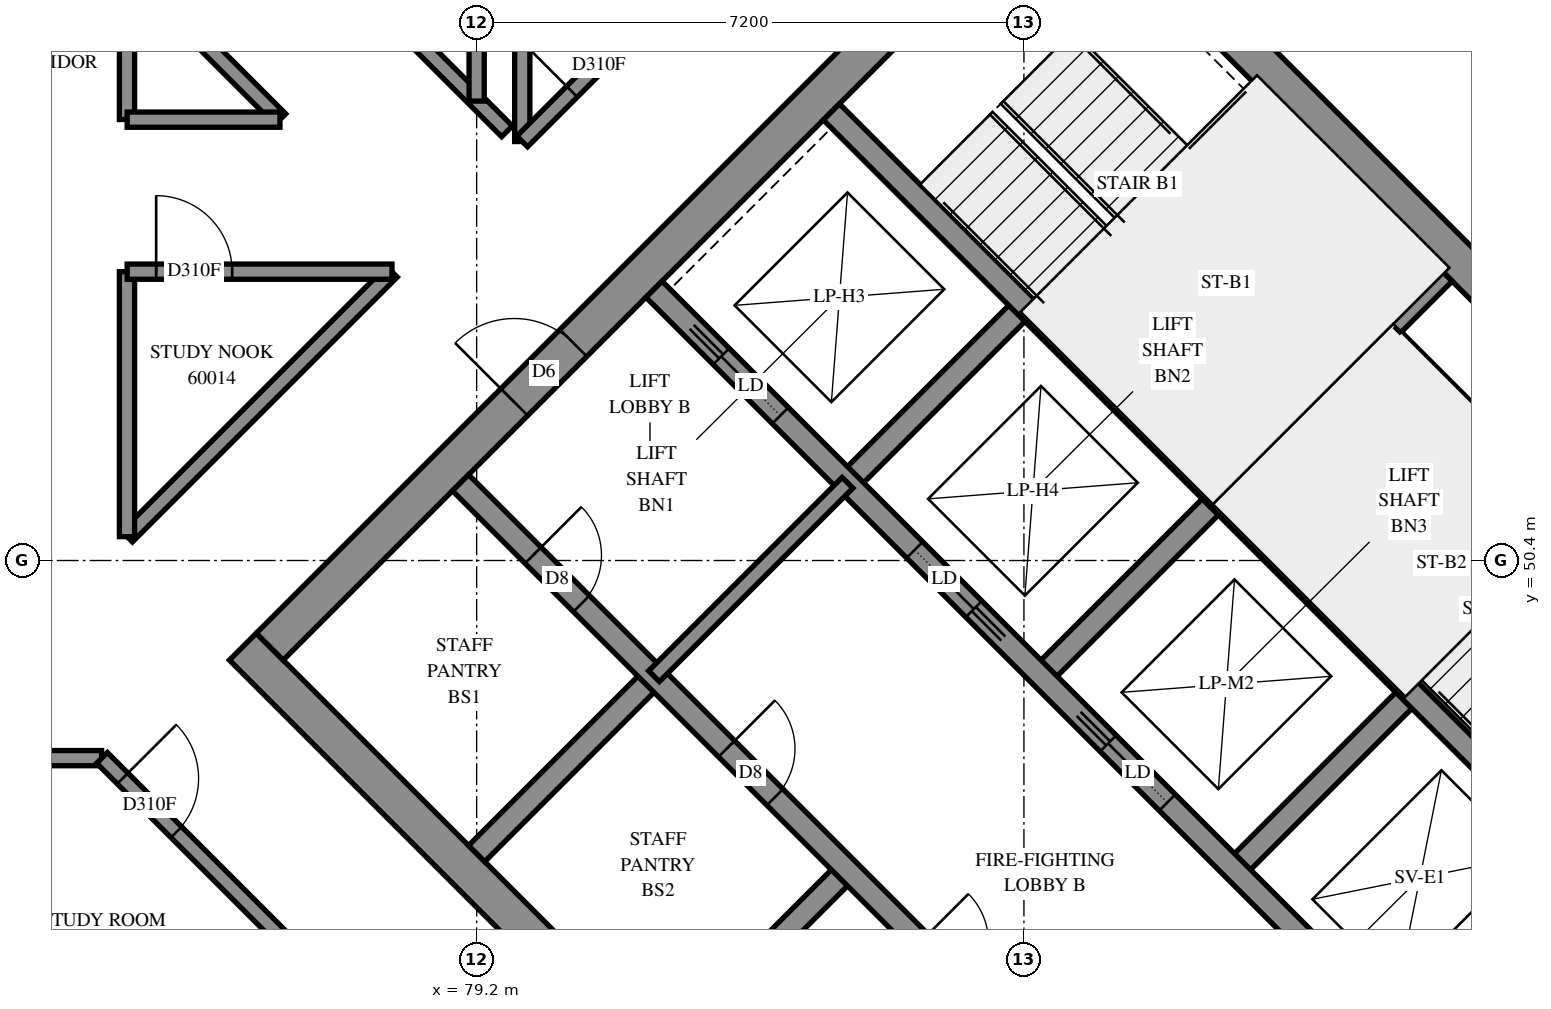
"""IFC4 building model, lengths in metres.
Left out: names, types, materials, properties, quantities, classifications, styles, units other than length and angle.
Written with IfcOpenShell. Run it as: python <this file> out.ifc"""

import sys

from ifc_helpers import new_model, si_unit, direction, frame, frame_2d, origin, place, context, subcontext, project, spatial, rectangle, extrude, element, fill, save


model = new_model("IFC4")
c1 = context("Model", 3, precision=1e-05, world=origin(), true_north=direction((0.0, 1.0)))
c2 = subcontext(c1, "Body", "Model", "MODEL_VIEW")
j1 = project(units=[si_unit("LENGTHUNIT", "METRE"), si_unit("PLANEANGLEUNIT", "RADIAN")], contexts=[c1])
p1 = place(None, origin())
s1 = spatial("IfcSite", under=j1, at=p1, CompositionType="ELEMENT")
p2 = place(p1, origin())
s2 = spatial("IfcBuilding", under=s1, at=p2, CompositionType="ELEMENT")
p3 = place(p2, frame((0.0, 0.0, 220.2)))
s3 = spatial("IfcBuildingStorey", under=s2, at=p3, CompositionType="ELEMENT", Elevation=220.2)
p4 = place(p3, frame((76.124, 49.267, -0.3), z_axis=(0.0, 0.0, 1.0), x_axis=(0.7071067812, -0.7071067812, 0.0)))
e1 = element("IfcWall", 1, at=p4, inside=s3, PredefinedType="SHEAR", context=c2, shape_type="SweptSolid", body=[
    extrude(rectangle(XDim=15.4, YDim=0.5, at=frame_2d((7.7, 0.0))), origin(), (0.0, 0.0, 1.0), 2.7),
])
p5 = place(p3, frame((86.66, 59.802, -0.3), z_axis=(0.0, 0.0, 1.0), x_axis=(0.7071067812, -0.7071067812, 0.0)))
e2 = element("IfcWall", 2, at=p5, inside=s3, PredefinedType="SHEAR", context=c2, shape_type="SweptSolid", body=[
    extrude(rectangle(XDim=15.4, YDim=0.5, at=frame_2d((7.7, 0.0))), origin(), (0.0, 0.0, 1.0), 2.7),
])
p6 = place(p5, frame((10.5, 0.0, 0.3)))
e3 = element("IfcOpeningElement", 3, at=p6, cuts=e2, PredefinedType="OPENING", context=c2, shape_type="SweptSolid", body=[
    extrude(rectangle(XDim=0.8, YDim=2.1, at=frame_2d((0.4, 1.05))), frame((0.0, 0.26, 0.0), z_axis=(0.0, -1.0, 0.0), x_axis=(1.0, 0.0, 0.0)), (0.0, 0.0, 1.0), 0.52),
])
p7 = place(p3, frame((76.478, 49.267, -0.3), z_axis=(0.0, 0.0, 1.0), x_axis=(0.7071067812, 0.7071067812, 0.0)))
e4 = element("IfcWall", 4, at=p7, inside=s3, PredefinedType="SHEAR", context=c2, shape_type="SweptSolid", body=[
    extrude(rectangle(XDim=14.4, YDim=0.5, at=frame_2d((7.2, 0.0))), origin(), (0.0, 0.0, 1.0), 2.7),
])
p8 = place(p7, frame((4.55, 0.0, 0.3)))
e5 = element("IfcOpeningElement", 5, at=p8, cuts=e4, PredefinedType="OPENING", context=c2, shape_type="SweptSolid", body=[
    extrude(rectangle(XDim=1.1, YDim=2.1, at=frame_2d((0.55, 1.05))), frame((0.0, 0.26, 0.0), z_axis=(0.0, -1.0, 0.0), x_axis=(1.0, 0.0, 0.0)), (0.0, 0.0, 1.0), 0.52),
])
p9 = place(p7, frame((11.35, 0.0, 0.3)))
e6 = element("IfcOpeningElement", 6, at=p9, cuts=e4, PredefinedType="OPENING", context=c2, shape_type="SweptSolid", body=[
    extrude(rectangle(XDim=1.1, YDim=2.1, at=frame_2d((0.55, 1.05))), frame((0.0, 0.26, 0.0), z_axis=(0.0, -1.0, 0.0), x_axis=(1.0, 0.0, 0.0)), (0.0, 0.0, 1.0), 0.52),
])
p10 = place(p3, frame((87.013, 38.731, -0.3), z_axis=(0.0, 0.0, 1.0), x_axis=(0.7071067812, 0.7071067812, 0.0)))
e7 = element("IfcWall", 7, at=p10, inside=s3, PredefinedType="SHEAR", context=c2, shape_type="SweptSolid", body=[
    extrude(rectangle(XDim=14.4, YDim=0.5, at=frame_2d((7.2, 0.0))), origin(), (0.0, 0.0, 1.0), 2.7),
])
p11 = place(p10, frame((4.55, 0.0, 0.3)))
e8 = element("IfcOpeningElement", 8, at=p11, cuts=e7, PredefinedType="OPENING", context=c2, shape_type="SweptSolid", body=[
    extrude(rectangle(XDim=1.1, YDim=2.1, at=frame_2d((0.55, 1.05))), frame((0.0, 0.26, 0.0), z_axis=(0.0, -1.0, 0.0), x_axis=(1.0, 0.0, 0.0)), (0.0, 0.0, 1.0), 0.52),
])
p12 = place(p10, frame((11.35, 0.0, 0.3)))
e9 = element("IfcOpeningElement", 9, at=p12, cuts=e7, PredefinedType="OPENING", context=c2, shape_type="SweptSolid", body=[
    extrude(rectangle(XDim=1.1, YDim=2.1, at=frame_2d((0.55, 1.05))), frame((0.0, 0.26, 0.0), z_axis=(0.0, -1.0, 0.0), x_axis=(1.0, 0.0, 0.0)), (0.0, 0.0, 1.0), 0.52),
])
for number, where, z_axis, x_axis in (
    (10, (79.2, 46.544, 0.0), (0.0, 0.0, 1.0), (0.707, 0.707, 0.0)),
    (11, (84.079, 51.423, 0.0), (0.0, 0.0, 1.0), (0.707, 0.707, 0.0)),
):
    element("IfcWall", number, at=place(p3, frame(where, z_axis=z_axis, x_axis=x_axis)), inside=s3, PredefinedType="SOLIDWALL", context=c2, shape_type="SweptSolid", body=[
        extrude(rectangle(XDim=3.3, YDim=0.3, at=frame_2d((1.65, 0.0))), origin(), (0.0, 0.0, 1.0), 3.1),
    ])
p13 = place(p3, frame((81.746, 43.999, 0.0), z_axis=(0.0, 0.0, 1.0), x_axis=(0.7071067812, 0.7071067812, 0.0)))
e12 = element("IfcWall", 12, at=p13, inside=s3, PredefinedType="SOLIDWALL", context=c2, shape_type="SweptSolid", body=[
    extrude(rectangle(XDim=3.3, YDim=0.3, at=frame_2d((1.65, 0.0))), origin(), (0.0, 0.0, 1.0), 3.1),
])
for number, where, z_axis, x_axis in (
    (13, (86.625, 48.878, 0.0), (0.0, 0.0, 1.0), (0.707, 0.707, 0.0)),
    (14, (89.17, 46.332, 0.0), (0.0, 0.0, 1.0), (0.707, 0.707, 0.0)),
):
    element("IfcWall", number, at=place(p3, frame(where, z_axis=z_axis, x_axis=x_axis)), inside=s3, PredefinedType="SOLIDWALL", context=c2, shape_type="SweptSolid", body=[
        extrude(rectangle(XDim=3.3, YDim=0.3, at=frame_2d((1.65, 0.0))), origin(), (0.0, 0.0, 1.0), 3.1),
    ])
p14 = place(p3, frame((78.988, 51.423, 0.0), z_axis=(0.0, 0.0, 1.0), x_axis=(0.7071067812, -0.7071067812, 0.0)))
e15 = element("IfcWall", 15, at=p14, inside=s3, PredefinedType="SOLIDWALL", context=c2, shape_type="SweptSolid", body=[
    extrude(rectangle(XDim=14.4, YDim=0.3, at=frame_2d((7.2, 0.0))), origin(), (0.0, 0.0, 1.0), 3.1),
])
p15 = place(p14, frame((1.35, 0.0, 0.0)))
e16 = element("IfcOpeningElement", 16, at=p15, cuts=e15, PredefinedType="OPENING", context=c2, shape_type="SweptSolid", body=[
    extrude(rectangle(XDim=0.9, YDim=2.1, at=frame_2d((0.45, 1.05))), frame((0.0, 0.16, 0.0), z_axis=(0.0, -1.0, 0.0), x_axis=(1.0, 0.0, 0.0)), (0.0, 0.0, 1.0), 0.32),
])
p16 = place(p14, frame((4.95, 0.0, 0.0)))
e17 = element("IfcOpeningElement", 17, at=p16, cuts=e15, PredefinedType="OPENING", context=c2, shape_type="SweptSolid", body=[
    extrude(rectangle(XDim=0.9, YDim=2.1, at=frame_2d((0.45, 1.05))), frame((0.0, 0.16, 0.0), z_axis=(0.0, -1.0, 0.0), x_axis=(1.0, 0.0, 0.0)), (0.0, 0.0, 1.0), 0.32),
])
p17 = place(p14, frame((8.55, 0.0, 0.0)))
e18 = element("IfcOpeningElement", 18, at=p17, cuts=e15, PredefinedType="OPENING", context=c2, shape_type="SweptSolid", body=[
    extrude(rectangle(XDim=0.9, YDim=2.1, at=frame_2d((0.45, 1.05))), frame((0.0, 0.16, 0.0), z_axis=(0.0, -1.0, 0.0), x_axis=(1.0, 0.0, 0.0)), (0.0, 0.0, 1.0), 0.32),
])
p18 = place(p14, frame((12.05, 0.0, 0.0)))
e19 = element("IfcOpeningElement", 19, at=p18, cuts=e15, PredefinedType="OPENING", context=c2, shape_type="SweptSolid", body=[
    extrude(rectangle(XDim=1.1, YDim=2.1, at=frame_2d((0.55, 1.05))), frame((0.0, 0.16, 0.0), z_axis=(0.0, -1.0, 0.0), x_axis=(1.0, 0.0, 0.0)), (0.0, 0.0, 1.0), 0.32),
])
p19 = place(p3, frame((81.534, 53.969, 0.0), z_axis=(0.0, 0.0, 1.0), x_axis=(0.707103309, -0.7071102534, 0.0)))
e20 = element("IfcWall", 20, at=p19, inside=s3, PredefinedType="SOLIDWALL", context=c2, shape_type="SweptSolid", body=[
    extrude(rectangle(XDim=14.4, YDim=0.3, at=frame_2d((7.2, 0.0))), origin(), (0.0, 0.0, 1.0), 3.1),
])
p20 = place(p19, frame((1.25, 0.0, 0.0)))
e21 = element("IfcOpeningElement", 21, at=p20, cuts=e20, PredefinedType="OPENING", context=c2, shape_type="SweptSolid", body=[
    extrude(rectangle(XDim=1.1, YDim=2.1, at=frame_2d((0.55, 1.05))), frame((0.0, 0.16, 0.0), z_axis=(0.0, -1.0, 0.0), x_axis=(1.0, 0.0, 0.0)), (0.0, 0.0, 1.0), 0.32),
])
p21 = place(p19, frame((4.85, 0.0, 0.0)))
e22 = element("IfcOpeningElement", 22, at=p21, cuts=e20, PredefinedType="OPENING", context=c2, shape_type="SweptSolid", body=[
    extrude(rectangle(XDim=1.1, YDim=2.1, at=frame_2d((0.55, 1.05))), frame((0.0, 0.16, 0.0), z_axis=(0.0, -1.0, 0.0), x_axis=(1.0, 0.0, 0.0)), (0.0, 0.0, 1.0), 0.32),
])
p22 = place(p19, frame((8.45, 0.0, 0.0)))
e23 = element("IfcOpeningElement", 23, at=p22, cuts=e20, PredefinedType="OPENING", context=c2, shape_type="SweptSolid", body=[
    extrude(rectangle(XDim=1.1, YDim=2.1, at=frame_2d((0.55, 1.05))), frame((0.0, 0.16, 0.0), z_axis=(0.0, -1.0, 0.0), x_axis=(1.0, 0.0, 0.0)), (0.0, 0.0, 1.0), 0.32),
])
p23 = place(p19, frame((12.05, 0.0, 0.0)))
e24 = element("IfcOpeningElement", 24, at=p23, cuts=e20, PredefinedType="OPENING", context=c2, shape_type="SweptSolid", body=[
    extrude(rectangle(XDim=1.1, YDim=2.1, at=frame_2d((0.55, 1.05))), frame((0.0, 0.16, 0.0), z_axis=(0.0, -1.0, 0.0), x_axis=(1.0, 0.0, 0.0)), (0.0, 0.0, 1.0), 0.32),
])
for number, where, z_axis, x_axis in (
    (25, (83.867, 56.302, 0.0), (0.0, 0.0, 1.0), (0.707, -0.707, 0.0)),
    (26, (88.958, 51.211, 0.0), (0.0, 0.0, 1.0), (0.707, -0.707, 0.0)),
):
    element("IfcWall", number, at=place(p3, frame(where, z_axis=z_axis, x_axis=x_axis)), inside=s3, PredefinedType="SOLIDWALL", context=c2, shape_type="SweptSolid", body=[
        extrude(rectangle(XDim=7.2, YDim=0.3, at=frame_2d((3.6, 0.0))), origin(), (0.0, 0.0, 1.0), 3.1),
    ])
p24 = place(p3, frame((88.958, 51.211, 0.0), z_axis=(0.0, 0.0, 1.0), x_axis=(0.7071067812, 0.7071067812, 0.0)))
e27 = element("IfcWall", 27, at=p24, inside=s3, PredefinedType="SOLIDWALL", context=c2, shape_type="SweptSolid", body=[
    extrude(rectangle(XDim=4.2, YDim=0.3, at=frame_2d((2.1, 0.0))), origin(), (0.0, 0.0, 1.0), 3.1),
])
p25 = place(p3, frame((91.313, 53.354, 0.0), z_axis=(0.0, 0.0, 1.0), x_axis=(0.7071147811, -0.7070987812, 0.0)))
e28 = element("IfcWall", 28, at=p25, inside=s3, PredefinedType="PARTITIONING", context=c2, shape_type="SweptSolid", body=[
    extrude(rectangle(XDim=6.25, YDim=0.15, at=frame_2d((3.125, 0.0))), origin(), (0.0, 0.0, 1.0), 3.1),
])
p26 = place(p3, frame((81.534, 48.878, 0.0), z_axis=(0.0, 0.0, 1.0), x_axis=(0.707092892, 0.7071206701, 0.0)))
e29 = element("IfcWall", 29, at=p26, inside=s3, PredefinedType="PARTITIONING", context=c2, shape_type="SweptSolid", body=[
    extrude(rectangle(XDim=3.6, YDim=0.2, at=frame_2d((1.8, 0.0))), origin(), (0.0, 0.0, 1.0), 3.1),
])
p27 = place(p3, frame((55.0, 47.8, 0.0), z_axis=(0.0, 0.0, 1.0), x_axis=(1.0, 0.0, 0.0)))
e30 = element("IfcWall", 30, at=p27, inside=s3, PredefinedType="PARTITIONING", context=c2, shape_type="SweptSolid", body=[
    extrude(rectangle(XDim=19.266, YDim=0.2, at=frame_2d((9.633, 0.0))), origin(), (0.0, 0.0, 1.0), 3.1),
])
p28 = place(p27, frame((4.9, 0.0, 0.0)))
e31 = element("IfcOpeningElement", 31, at=p28, cuts=e30, PredefinedType="OPENING", context=c2, shape_type="SweptSolid", body=[
    extrude(rectangle(XDim=0.9, YDim=2.1, at=frame_2d((0.45, 1.05))), frame((0.0, 0.11, 0.0), z_axis=(0.0, -1.0, 0.0), x_axis=(1.0, 0.0, 0.0)), (0.0, 0.0, 1.0), 0.22),
])
p29 = place(p27, frame((6.6, 0.0, 0.0)))
e32 = element("IfcOpeningElement", 32, at=p29, cuts=e30, PredefinedType="OPENING", context=c2, shape_type="SweptSolid", body=[
    extrude(rectangle(XDim=0.9, YDim=2.1, at=frame_2d((0.45, 1.05))), frame((0.0, 0.11, 0.0), z_axis=(0.0, -1.0, 0.0), x_axis=(1.0, 0.0, 0.0)), (0.0, 0.0, 1.0), 0.22),
])
p30 = place(p27, frame((13.661, 0.0, 0.0)))
e33 = element("IfcOpeningElement", 33, at=p30, cuts=e30, PredefinedType="OPENING", context=c2, shape_type="SweptSolid", body=[
    extrude(rectangle(XDim=0.9, YDim=2.1, at=frame_2d((0.45, 1.05))), frame((0.0, 0.11, 0.0), z_axis=(0.0, -1.0, 0.0), x_axis=(1.0, 0.0, 0.0)), (0.0, 0.0, 1.0), 0.22),
])
p31 = place(p3, frame((86.835, 62.945, 0.0), z_axis=(0.0, 0.0, 1.0), x_axis=(0.7072533434, -0.7069601886, 0.0)))
e34 = element("IfcWall", 34, at=p31, inside=s3, PredefinedType="PARTITIONING", context=c2, shape_type="SweptSolid", body=[
    extrude(rectangle(XDim=11.598, YDim=0.2, at=frame_2d((5.799, 0.0))), origin(), (0.0, 0.0, 1.0), 3.1),
])
p32 = place(p31, frame((3.156, 0.0, 0.0)))
e35 = element("IfcOpeningElement", 35, at=p32, cuts=e34, PredefinedType="OPENING", context=c2, shape_type="SweptSolid", body=[
    extrude(rectangle(XDim=0.9, YDim=2.1, at=frame_2d((0.45, 1.05))), frame((0.0, 0.11, 0.0), z_axis=(0.0, -1.0, 0.0), x_axis=(1.0, 0.0, 0.0)), (0.0, 0.0, 1.0), 0.22),
])
p33 = place(p3, frame((79.8, 55.912, 0.0), z_axis=(0.0, 0.0, 1.0), x_axis=(0.0, 1.0, 0.0)))
e36 = element("IfcWall", 36, at=p33, inside=s3, PredefinedType="PARTITIONING", context=c2, shape_type="SweptSolid", body=[
    extrude(rectangle(XDim=11.596, YDim=0.2, at=frame_2d((5.798, 0.0))), origin(), (0.0, 0.0, 1.0), 3.1),
])
p34 = place(p3, frame((79.799, 55.913, 0.0), z_axis=(0.0, 0.0, 1.0), x_axis=(0.7071067812, 0.7071067812, 0.0)))
e37 = element("IfcWall", 37, at=p34, inside=s3, PredefinedType="PARTITIONING", context=c2, shape_type="SweptSolid", body=[
    extrude(rectangle(XDim=9.95, YDim=0.2, at=frame_2d((4.975, 0.0))), origin(), (0.0, 0.0, 1.0), 3.1),
])
p35 = place(p34, frame((0.927, 0.0, 0.0)))
e38 = element("IfcOpeningElement", 38, at=p35, cuts=e37, PredefinedType="OPENING", context=c2, shape_type="SweptSolid", body=[
    extrude(rectangle(XDim=1.0, YDim=2.1, at=frame_2d((0.5, 1.05))), frame((0.0, 0.11, 0.0), z_axis=(0.0, -1.0, 0.0), x_axis=(1.0, 0.0, 0.0)), (0.0, 0.0, 1.0), 0.22),
])
p36 = place(p3, frame((74.601, 50.715, 0.0), z_axis=(0.0, 0.0, 1.0), x_axis=(0.7071067812, 0.7071067812, 0.0)))
e39 = element("IfcWall", 39, at=p36, inside=s3, PredefinedType="PARTITIONING", context=c2, shape_type="SweptSolid", body=[
    extrude(rectangle(XDim=4.927, YDim=0.2, at=frame_2d((2.464, 0.0))), origin(), (0.0, 0.0, 1.0), 3.1),
])
p37 = place(p3, frame((74.272, 47.803, 0.0), z_axis=(0.0, 0.0, 1.0), x_axis=(0.7071067812, -0.7071067812, 0.0)))
e40 = element("IfcWall", 40, at=p37, inside=s3, PredefinedType="PARTITIONING", context=c2, shape_type="SweptSolid", body=[
    extrude(rectangle(XDim=4.641, YDim=0.2, at=frame_2d((2.321, 0.0))), origin(), (0.0, 0.0, 1.0), 3.1),
])
p38 = place(p37, frame((0.382, 0.0, 0.0)))
e41 = element("IfcOpeningElement", 41, at=p38, cuts=e40, PredefinedType="OPENING", context=c2, shape_type="SweptSolid", body=[
    extrude(rectangle(XDim=1.0, YDim=2.1, at=frame_2d((0.5, 1.05))), frame((0.0, 0.11, 0.0), z_axis=(0.0, -1.0, 0.0), x_axis=(1.0, 0.0, 0.0)), (0.0, 0.0, 1.0), 0.22),
])
p39 = place(p3, frame((76.513, 59.131, 0.0), z_axis=(0.0, 0.0, 1.0), x_axis=(0.7073587997, -0.7068546728, 0.0)))
e42 = element("IfcWall", 42, at=p39, inside=s3, PredefinedType="PARTITIONING", context=c2, shape_type="SweptSolid", body=[
    extrude(rectangle(XDim=4.364, YDim=0.2, at=frame_2d((2.182, 0.0))), origin(), (0.0, 0.0, 1.0), 3.1),
])
p40 = place(p3, frame((74.6, 50.714, 0.0), z_axis=(0.0, 0.0, 1.0), x_axis=(0.0, 1.0, 0.0)))
e43 = element("IfcWall", 43, at=p40, inside=s3, PredefinedType="PARTITIONING", context=c2, shape_type="SweptSolid", body=[
    extrude(rectangle(XDim=3.486, YDim=0.2, at=frame_2d((1.743, 0.0))), origin(), (0.0, 0.0, 1.0), 3.1),
])
p41 = place(p3, frame((74.602, 54.2, 0.0), z_axis=(0.0, 0.0, 1.0), x_axis=(1.0, 0.0, 0.0)))
e44 = element("IfcWall", 44, at=p41, inside=s3, PredefinedType="PARTITIONING", context=c2, shape_type="SweptSolid", body=[
    extrude(rectangle(XDim=3.484, YDim=0.2, at=frame_2d((1.742, 0.0))), origin(), (0.0, 0.0, 1.0), 3.1),
])
p42 = place(p41, frame((0.382, 0.0, 0.0)))
e45 = element("IfcOpeningElement", 45, at=p42, cuts=e44, PredefinedType="OPENING", context=c2, shape_type="SweptSolid", body=[
    extrude(rectangle(XDim=1.0, YDim=2.1, at=frame_2d((0.5, 1.05))), frame((0.0, 0.11, 0.0), z_axis=(0.0, -1.0, 0.0), x_axis=(1.0, 0.0, 0.0)), (0.0, 0.0, 1.0), 0.22),
])
p43 = place(p3, frame((74.606, 58.218, 0.0), z_axis=(0.0, 0.0, 1.0), x_axis=(0.7071067812, -0.7071067812, 0.0)))
e46 = element("IfcWall", 46, at=p43, inside=s3, PredefinedType="PARTITIONING", context=c2, shape_type="SweptSolid", body=[
    extrude(rectangle(XDim=2.845, YDim=0.2, at=frame_2d((1.423, 0.0))), origin(), (0.0, 0.0, 1.0), 3.1),
])
for number, where, z_axis, x_axis in (
    (47, (74.6, 56.202, 0.0), (0.0, 0.0, 1.0), (0.0, 1.0, 0.0)),
    (48, (74.602, 56.2, 0.0), (0.0, 0.0, 1.0), (1.0, 0.0, 0.0)),
):
    element("IfcWall", number, at=place(p3, frame(where, z_axis=z_axis, x_axis=x_axis)), inside=s3, PredefinedType="PARTITIONING", context=c2, shape_type="SweptSolid", body=[
        extrude(rectangle(XDim=2.01, YDim=0.2, at=frame_2d((1.005, 0.0))), origin(), (0.0, 0.0, 1.0), 3.1),
    ])
p44 = place(p3, frame((79.2, 56.444, 0.0), z_axis=(0.0, 0.0, 1.0), x_axis=(0.0, 1.0, 0.0)))
e49 = element("IfcWall", 49, at=p44, inside=s3, PredefinedType="PARTITIONING", context=c2, shape_type="SweptSolid", body=[
    extrude(rectangle(XDim=0.756, YDim=0.2, at=frame_2d((0.378, 0.0))), origin(), (0.0, 0.0, 1.0), 3.1),
])
p45 = place(p8, origin())
e50 = element("IfcDoor", 50, at=p45, inside=s3, OperationType="DOUBLE_DOOR_SINGLE_SWING", PredefinedType="DOOR", context=c2, shape_type="SweptSolid", body=[
    extrude(rectangle(XDim=1.1, YDim=2.1, at=frame_2d((0.55, 1.05))), frame((0.0, 0.025, 0.0), z_axis=(0.0, -1.0, 0.0), x_axis=(1.0, 0.0, 0.0)), (0.0, 0.0, 1.0), 0.05),
])
fill(e5, e50)
p46 = place(p15, origin())
e51 = element("IfcDoor", 51, at=p46, inside=s3, OperationType="SINGLE_SWING_LEFT", PredefinedType="DOOR", context=c2, shape_type="SweptSolid", body=[
    extrude(rectangle(XDim=0.9, YDim=2.1, at=frame_2d((0.45, 1.05))), frame((0.0, 0.025, 0.0), z_axis=(0.0, -1.0, 0.0), x_axis=(1.0, 0.0, 0.0)), (0.0, 0.0, 1.0), 0.05),
])
fill(e16, e51)
p47 = place(p16, origin())
e52 = element("IfcDoor", 52, at=p47, inside=s3, OperationType="SINGLE_SWING_LEFT", PredefinedType="DOOR", context=c2, shape_type="SweptSolid", body=[
    extrude(rectangle(XDim=0.9, YDim=2.1, at=frame_2d((0.45, 1.05))), frame((0.0, 0.025, 0.0), z_axis=(0.0, -1.0, 0.0), x_axis=(1.0, 0.0, 0.0)), (0.0, 0.0, 1.0), 0.05),
])
fill(e17, e52)
p48 = place(p20, origin())
e53 = element("IfcDoor", 53, at=p48, inside=s3, OperationType="SLIDING_TO_LEFT", PredefinedType="DOOR", context=c2, shape_type="SweptSolid", body=[
    extrude(rectangle(XDim=1.1, YDim=2.1, at=frame_2d((0.55, 1.05))), frame((0.0, 0.025, 0.0), z_axis=(0.0, -1.0, 0.0), x_axis=(1.0, 0.0, 0.0)), (0.0, 0.0, 1.0), 0.05),
])
fill(e21, e53)
p49 = place(p21, origin())
e54 = element("IfcDoor", 54, at=p49, inside=s3, OperationType="SLIDING_TO_RIGHT", PredefinedType="DOOR", context=c2, shape_type="SweptSolid", body=[
    extrude(rectangle(XDim=1.1, YDim=2.1, at=frame_2d((0.55, 1.05))), frame((0.0, 0.025, 0.0), z_axis=(0.0, -1.0, 0.0), x_axis=(1.0, 0.0, 0.0)), (0.0, 0.0, 1.0), 0.05),
])
fill(e22, e54)
p50 = place(p22, origin())
e55 = element("IfcDoor", 55, at=p50, inside=s3, OperationType="SLIDING_TO_LEFT", PredefinedType="DOOR", context=c2, shape_type="SweptSolid", body=[
    extrude(rectangle(XDim=1.1, YDim=2.1, at=frame_2d((0.55, 1.05))), frame((0.0, 0.025, 0.0), z_axis=(0.0, -1.0, 0.0), x_axis=(1.0, 0.0, 0.0)), (0.0, 0.0, 1.0), 0.05),
])
fill(e23, e55)
p51 = place(p42, origin())
e56 = element("IfcDoor", 56, at=p51, inside=s3, OperationType="SINGLE_SWING_RIGHT", PredefinedType="DOOR", context=c2, shape_type="SweptSolid", body=[
    extrude(rectangle(XDim=1.0, YDim=2.1, at=frame_2d((0.5, 1.05))), frame((0.0, 0.025, 0.0), z_axis=(0.0, -1.0, 0.0), x_axis=(1.0, 0.0, 0.0)), (0.0, 0.0, 1.0), 0.05),
])
fill(e45, e56)
p52 = place(p38, origin())
e57 = element("IfcDoor", 57, at=p52, inside=s3, OperationType="SINGLE_SWING_LEFT", PredefinedType="DOOR", context=c2, shape_type="SweptSolid", body=[
    extrude(rectangle(XDim=1.0, YDim=2.1, at=frame_2d((0.5, 1.05))), frame((0.0, 0.025, 0.0), z_axis=(0.0, -1.0, 0.0), x_axis=(1.0, 0.0, 0.0)), (0.0, 0.0, 1.0), 0.05),
])
fill(e41, e57)
p53 = place(p35, origin())
e58 = element("IfcDoor", 58, at=p53, inside=s3, OperationType="SINGLE_SWING_RIGHT", PredefinedType="DOOR", context=c2, shape_type="SweptSolid", body=[
    extrude(rectangle(XDim=1.0, YDim=2.1, at=frame_2d((0.5, 1.05))), frame((0.0, 0.025, 0.0), z_axis=(0.0, -1.0, 0.0), x_axis=(1.0, 0.0, 0.0)), (0.0, 0.0, 1.0), 0.05),
])
fill(e38, e58)
save(model, sys.argv[1])
